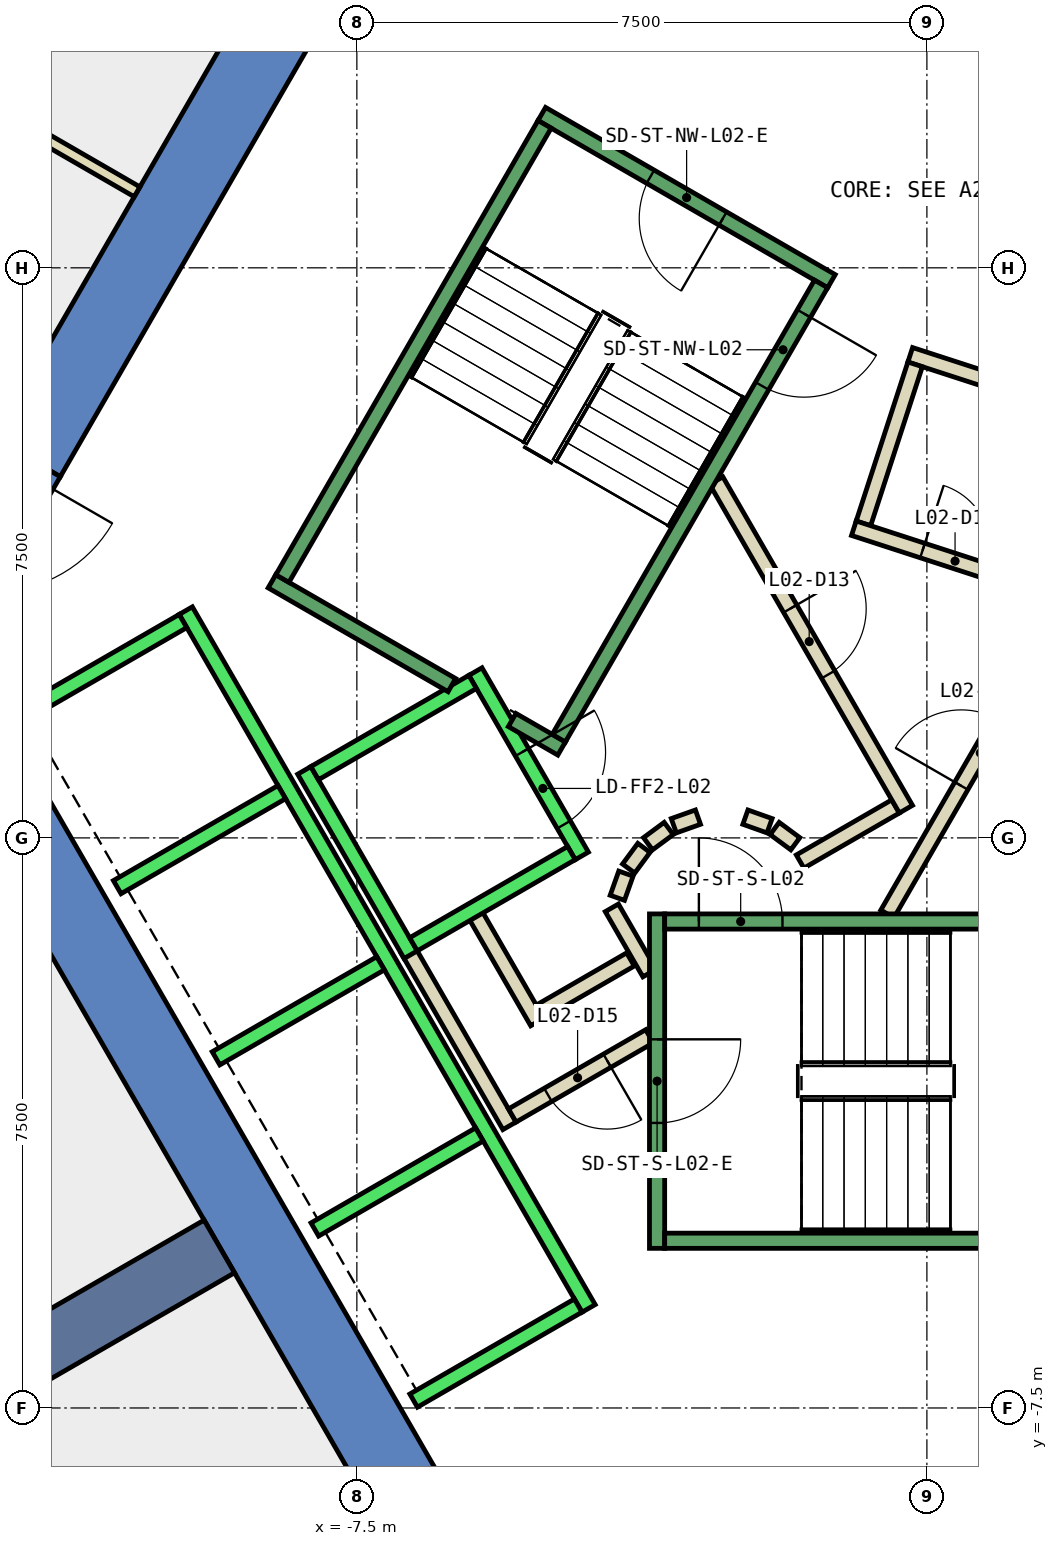
"""IFC4 building model, lengths in metres.
Left out: names, types, materials, properties, quantities, classifications, styles, units other than length and angle.
Written with IfcOpenShell. Run it as: python <this file> out.ifc"""

import sys

from ifc_helpers import new_model, si_unit, direction, frame, frame_2d, origin, place, context, subcontext, project, spatial, polyline, rectangle, outline, extrude, element, fill, save


model = new_model("IFC4")
c1 = context("Model", 3, precision=1e-05, world=origin(), true_north=direction((0.0, 1.0)))
c2 = subcontext(c1, "Body", "Model", "MODEL_VIEW")
j1 = project(units=[si_unit("LENGTHUNIT", "METRE"), si_unit("PLANEANGLEUNIT", "RADIAN")], contexts=[c1])
p1 = place(None, origin())
s1 = spatial("IfcSite", under=j1, at=p1, CompositionType="ELEMENT")
p2 = place(p1, origin())
s2 = spatial("IfcBuilding", under=s1, at=p2, CompositionType="ELEMENT")
p3 = place(p2, frame((0.0, 0.0, 15.0)))
s3 = spatial("IfcBuildingStorey", under=s2, at=p3, CompositionType="ELEMENT", Elevation=15.0)
p4 = place(p3, frame((0.0, 0.0, -0.45)))
e1 = element("IfcWall", 1, at=p4, inside=s3, PredefinedType="SHEAR", context=c2, shape_type="SweptSolid", body=[
    extrude(outline(polyline([(-12.267, 5.252), (-11.402, 4.752), (-6.351, 13.5), (-6.928, 14.5), (-12.267, 5.252)])), origin(), (0.0, 0.0, 1.0), 5.0),
])
p5 = place(p3, frame((0.0, 0.0, 3.6)))
e2 = element("IfcWall", 2, at=p5, inside=s3, PredefinedType="SHEAR", context=c2, shape_type="SweptSolid", body=[
    extrude(outline(polyline([(-13.267, 3.52), (-12.402, 3.02), (-11.402, 4.752), (-12.267, 5.252), (-13.267, 3.52)])), origin(), (0.0, 0.0, 1.0), 0.95),
])
p6 = place(p3, frame((0.0, 0.0, -0.45)))
e3 = element("IfcWall", 3, at=p6, inside=s3, PredefinedType="SHEAR", context=c2, shape_type="SweptSolid", body=[
    extrude(outline(polyline([(-13.856, 2.5), (-6.928, -9.5), (-6.351, -8.5), (-12.702, 2.5), (-13.856, 2.5)])), origin(), (0.0, 0.0, 1.0), 5.0),
])
p7 = place(p3, frame((-9.31, -5.375, -0.45), z_axis=(0.0, 0.0, 1.0), x_axis=(-0.866017533419, -0.500013631625, 0.0)))
e4 = element("IfcWall", 4, at=p7, inside=s3, PredefinedType="SHEAR", context=c2, shape_type="SweptSolid", body=[
    extrude(rectangle(XDim=9.0, YDim=0.8, at=frame_2d((4.5, 0.0))), origin(), (0.0, 0.0, 1.0), 5.0),
])
p8 = place(p3, frame((-3.9, -1.599, 0.0), z_axis=(0.0, 0.0, 1.0), x_axis=(-0.865969445389, -0.500096910261, 0.0)))
e5 = element("IfcWall", 5, at=p8, inside=s3, PredefinedType="PARTITIONING", context=c2, shape_type="SweptSolid", body=[
    extrude(rectangle(XDim=1.373, YDim=0.2, at=frame_2d((0.687, 0.0))), origin(), (0.0, 0.0, 1.0), 4.55),
])
p9 = place(p3, frame((-5.126, -2.422, 0.0), z_axis=(0.0, 0.0, 1.0), x_axis=(-0.500062241894, 0.865989465428, 0.0)))
e6 = element("IfcWall", 6, at=p9, inside=s3, PredefinedType="PARTITIONING", context=c2, shape_type="SweptSolid", body=[
    extrude(rectangle(XDim=1.7, YDim=0.2, at=frame_2d((0.85, 0.0))), origin(), (0.0, 0.0, 1.0), 4.55),
])
p10 = place(p3, frame((-5.492, -3.788, 0.0), z_axis=(0.0, 0.0, 1.0), x_axis=(-0.500008949224, 0.866020236886, 0.0)))
e7 = element("IfcWall", 7, at=p10, inside=s3, PredefinedType="PARTITIONING", context=c2, shape_type="SweptSolid", body=[
    extrude(rectangle(XDim=2.68, YDim=0.2, at=frame_2d((1.34, 0.0))), origin(), (0.0, 0.0, 1.0), 4.55),
])
p11 = place(p3, frame((-4.145, -0.92, 0.0), z_axis=(0.0, 0.0, 1.0), x_axis=(0.499743786207, -0.866173278362, 0.0)))
e8 = element("IfcWall", 8, at=p11, inside=s3, PredefinedType="PARTITIONING", context=c2, shape_type="SweptSolid", body=[
    extrude(rectangle(XDim=0.991, YDim=0.2, at=frame_2d((0.495, 0.0))), origin(), (0.0, 0.0, 1.0), 4.55),
])
p12 = place(p3, frame((-3.65, -2.61, 0.0), z_axis=(0.0, 0.0, 1.0), x_axis=(-0.866072462134, -0.499918483688, 0.0)))
e9 = element("IfcWall", 9, at=p12, inside=s3, PredefinedType="PARTITIONING", context=c2, shape_type="SweptSolid", body=[
    extrude(rectangle(XDim=2.084, YDim=0.2, at=frame_2d((1.042, 0.0))), origin(), (0.0, 0.0, 1.0), 4.55),
])
p13 = place(p12, frame((0.642, 0.0, 0.0)))
e10 = element("IfcOpeningElement", 10, at=p13, cuts=e9, PredefinedType="OPENING", context=c2, shape_type="SweptSolid", body=[
    extrude(rectangle(XDim=0.9, YDim=2.1, at=frame_2d((0.45, 1.05))), frame((0.0, 0.11, 0.0), z_axis=(0.0, -1.0, 0.0), x_axis=(1.0, 0.0, 0.0)), (0.0, 0.0, 1.0), 0.22),
])
p14 = place(p3, frame((2.285, 5.543, 0.0), z_axis=(0.0, 0.0, 1.0), x_axis=(-0.951121264368, 0.308817649215, 0.0)))
e11 = element("IfcWall", 11, at=p14, inside=s3, PredefinedType="PARTITIONING", context=c2, shape_type="SweptSolid", body=[
    extrude(rectangle(XDim=2.633, YDim=0.2, at=frame_2d((1.316, 0.0))), origin(), (0.0, 0.0, 1.0), 4.55),
])
p15 = place(p3, frame((-0.155, 6.23, 0.0), z_axis=(0.0, 0.0, 1.0), x_axis=(-0.309093600997, -0.951031621884, 0.0)))
e12 = element("IfcWall", 12, at=p15, inside=s3, PredefinedType="PARTITIONING", context=c2, shape_type="SweptSolid", body=[
    extrude(rectangle(XDim=2.2, YDim=0.2, at=frame_2d((1.1, 0.0))), origin(), (0.0, 0.0, 1.0), 4.55),
])
p16 = place(p3, frame((-0.961, 4.074, 0.0), z_axis=(0.0, 0.0, 1.0), x_axis=(0.951079555704, -0.308946077369, 0.0)))
e13 = element("IfcWall", 13, at=p16, inside=s3, PredefinedType="PARTITIONING", context=c2, shape_type="SweptSolid", body=[
    extrude(rectangle(XDim=2.8, YDim=0.2, at=frame_2d((1.4, 0.0))), origin(), (0.0, 0.0, 1.0), 4.55),
])
p17 = place(p16, frame((0.95, 0.0, 0.0)))
e14 = element("IfcOpeningElement", 14, at=p17, cuts=e13, PredefinedType="OPENING", context=c2, shape_type="SweptSolid", body=[
    extrude(rectangle(XDim=0.9, YDim=2.1, at=frame_2d((0.45, 1.05))), frame((0.0, 0.11, 0.0), z_axis=(0.0, -1.0, 0.0), x_axis=(1.0, 0.0, 0.0)), (0.0, 0.0, 1.0), 0.22),
])
p18 = place(p3, frame((-0.52, -1.0, 0.0), z_axis=(0.0, 0.0, 1.0), x_axis=(0.50011622646, 0.865958290007, 0.0)))
e15 = element("IfcWall", 15, at=p18, inside=s3, PredefinedType="PARTITIONING", context=c2, shape_type="SweptSolid", body=[
    extrude(rectangle(XDim=4.991, YDim=0.2, at=frame_2d((2.496, 0.0))), origin(), (0.0, 0.0, 1.0), 4.55),
])
p19 = place(p18, frame((1.945, 0.0, 0.0)))
e16 = element("IfcOpeningElement", 16, at=p19, cuts=e15, PredefinedType="OPENING", context=c2, shape_type="SweptSolid", body=[
    extrude(rectangle(XDim=1.0, YDim=2.1, at=frame_2d((0.5, 1.05))), frame((0.0, 0.11, 0.0), z_axis=(0.0, -1.0, 0.0), x_axis=(1.0, 0.0, 0.0)), (0.0, 0.0, 1.0), 0.22),
])
p20 = place(p3, frame((-0.412, 0.414, 0.0), z_axis=(0.0, 0.0, 1.0), x_axis=(-0.866017369001, -0.500013916395, 0.0)))
e17 = element("IfcWall", 17, at=p20, inside=s3, PredefinedType="PARTITIONING", context=c2, shape_type="SweptSolid", body=[
    extrude(rectangle(XDim=1.45, YDim=0.2, at=frame_2d((0.725, 0.0))), origin(), (0.0, 0.0, 1.0), 4.55),
])
p21 = place(p3, frame((-1.731, -0.077, 0.0), z_axis=(0.0, 0.0, 1.0), x_axis=(-0.804311165252, 0.594208338422, 0.0)))
e18 = element("IfcWall", 18, at=p21, inside=s3, PredefinedType="PARTITIONING", context=c2, shape_type="SweptSolid", body=[
    extrude(rectangle(XDim=0.338, YDim=0.2, at=frame_2d((0.169, 0.0))), origin(), (0.0, 0.0, 1.0), 4.55),
])
p22 = place(p3, frame((-2.07, 0.16, 0.0), z_axis=(0.0, 0.0, 1.0), x_axis=(-0.942199461132, 0.335052496547, 0.0)))
e19 = element("IfcWall", 19, at=p22, inside=s3, PredefinedType="PARTITIONING", context=c2, shape_type="SweptSolid", body=[
    extrude(rectangle(XDim=0.337, YDim=0.2, at=frame_2d((0.169, 0.0))), origin(), (0.0, 0.0, 1.0), 4.55),
])
p23 = place(p3, frame((-3.012, 0.273, 0.0), z_axis=(0.0, 0.0, 1.0), x_axis=(-0.942280615813, -0.334824194261, 0.0)))
e20 = element("IfcWall", 20, at=p23, inside=s3, PredefinedType="PARTITIONING", context=c2, shape_type="SweptSolid", body=[
    extrude(rectangle(XDim=0.338, YDim=0.2, at=frame_2d((0.169, 0.0))), origin(), (0.0, 0.0, 1.0), 4.55),
])
p24 = place(p3, frame((-3.397, 0.124, 0.0), z_axis=(0.0, 0.0, 1.0), x_axis=(-0.804311165252, -0.594208338422, 0.0)))
e21 = element("IfcWall", 21, at=p24, inside=s3, PredefinedType="PARTITIONING", context=c2, shape_type="SweptSolid", body=[
    extrude(rectangle(XDim=0.338, YDim=0.2, at=frame_2d((0.169, 0.0))), origin(), (0.0, 0.0, 1.0), 4.55),
])
p25 = place(p3, frame((-3.723, -0.131, 0.0), z_axis=(0.0, 0.0, 1.0), x_axis=(-0.594675113454, -0.803966112121, 0.0)))
e22 = element("IfcWall", 22, at=p25, inside=s3, PredefinedType="PARTITIONING", context=c2, shape_type="SweptSolid", body=[
    extrude(rectangle(XDim=0.338, YDim=0.2, at=frame_2d((0.169, 0.0))), origin(), (0.0, 0.0, 1.0), 4.55),
])
p26 = place(p3, frame((-3.96, -0.47, 0.0), z_axis=(0.0, 0.0, 1.0), x_axis=(-0.334824194261, -0.942280615813, 0.0)))
e23 = element("IfcWall", 23, at=p26, inside=s3, PredefinedType="PARTITIONING", context=c2, shape_type="SweptSolid", body=[
    extrude(rectangle(XDim=0.338, YDim=0.2, at=frame_2d((0.169, 0.0))), origin(), (0.0, 0.0, 1.0), 4.55),
])
p27 = place(p3, frame((-2.771, 4.7, 0.0), z_axis=(0.0, 0.0, 1.0), x_axis=(0.499969479948, -0.866043023828, 0.0)))
e24 = element("IfcWall", 24, at=p27, inside=s3, PredefinedType="PARTITIONING", context=c2, shape_type="SweptSolid", body=[
    extrude(rectangle(XDim=4.99, YDim=0.2, at=frame_2d((2.495, 0.0))), origin(), (0.0, 0.0, 1.0), 4.55),
])
p28 = place(p27, frame((1.945, 0.0, 0.0)))
e25 = element("IfcOpeningElement", 25, at=p28, cuts=e24, PredefinedType="OPENING", context=c2, shape_type="SweptSolid", body=[
    extrude(rectangle(XDim=1.0, YDim=2.1, at=frame_2d((0.5, 1.05))), frame((0.0, 0.11, 0.0), z_axis=(0.0, -1.0, 0.0), x_axis=(1.0, 0.0, 0.0)), (0.0, 0.0, 1.0), 0.22),
])
p29 = place(p3, frame((-10.392, 8.5, 0.0), z_axis=(0.0, 0.0, 1.0), x_axis=(-0.865967369837, 0.500100504277, 0.0)))
e26 = element("IfcWall", 26, at=p29, inside=s3, PredefinedType="PARTITIONING", context=c2, shape_type="SweptSolid", body=[
    extrude(rectangle(XDim=6.317, YDim=0.15, at=frame_2d((3.158, 0.0))), origin(), (0.0, 0.0, 1.0), 4.55),
])
p30 = place(p29, frame((2.33, 0.0, 0.0)))
e27 = element("IfcOpeningElement", 27, at=p30, cuts=e26, PredefinedType="OPENING", context=c2, shape_type="SweptSolid", body=[
    extrude(rectangle(XDim=1.8, YDim=2.1, at=frame_2d((0.9, 1.05))), frame((0.0, 0.085, 0.0), z_axis=(0.0, -1.0, 0.0), x_axis=(1.0, 0.0, 0.0)), (0.0, 0.0, 1.0), 0.17),
])
p31 = place(p3, frame((-5.94, 2.188, 0.0), z_axis=(0.0, 0.0, 1.0), x_axis=(0.49994636267, -0.866056369097, 0.0)))
e28 = element("IfcWall", 28, at=p31, inside=s3, PredefinedType="STANDARD", context=c2, shape_type="SweptSolid", body=[
    extrude(rectangle(XDim=2.8, YDim=0.2, at=frame_2d((1.4, 0.0))), origin(), (0.0, 0.0, 1.0), 4.55),
])
p32 = place(p31, frame((1.225, 0.0, 0.0)))
e29 = element("IfcOpeningElement", 29, at=p32, cuts=e28, PredefinedType="OPENING", context=c2, shape_type="SweptSolid", body=[
    extrude(rectangle(XDim=1.1, YDim=2.1, at=frame_2d((0.55, 1.05))), frame((0.0, 0.11, 0.0), z_axis=(0.0, -1.0, 0.0), x_axis=(1.0, 0.0, 0.0)), (0.0, 0.0, 1.0), 0.22),
])
p33 = place(p3, frame((-8.192, 0.888, 0.0), z_axis=(0.0, 0.0, 1.0), x_axis=(0.49994636267, -0.866056369097, 0.0)))
e30 = element("IfcWall", 30, at=p33, inside=s3, PredefinedType="STANDARD", context=c2, shape_type="SweptSolid", body=[
    extrude(rectangle(XDim=2.8, YDim=0.2, at=frame_2d((1.4, 0.0))), origin(), (0.0, 0.0, 1.0), 4.55),
])
for number, where, z_axis, x_axis in (
    (31, (-5.977, 2.052, 0.0), (0.0, 0.0, 1.0), (-0.866, -0.5, 0.0)),
    (32, (-4.677, -0.2, 0.0), (0.0, 0.0, 1.0), (-0.866, -0.5, 0.0)),
):
    element("IfcWall", number, at=place(p3, frame(where, z_axis=z_axis, x_axis=x_axis)), inside=s3, PredefinedType="STANDARD", context=c2, shape_type="SweptSolid", body=[
        extrude(rectangle(XDim=2.399, YDim=0.2, at=frame_2d((1.2, 0.0))), origin(), (0.0, 0.0, 1.0), 4.55),
    ])
p34 = place(p3, frame((-9.751, 2.99, 0.0), z_axis=(0.0, 0.0, 1.0), x_axis=(0.50000090737, -0.866024879913, 0.0)))
e33 = element("IfcWall", 33, at=p34, inside=s3, PredefinedType="STANDARD", context=c2, shape_type="SweptSolid", body=[
    extrude(rectangle(XDim=10.6, YDim=0.2, at=frame_2d((5.3, 0.0))), origin(), (0.0, 0.0, 1.0), 4.55),
])
p35 = place(p3, frame((-9.788, 2.853, 0.0), z_axis=(0.0, 0.0, 1.0), x_axis=(-0.865998541277, -0.500046524342, 0.0)))
e34 = element("IfcWall", 34, at=p35, inside=s3, PredefinedType="STANDARD", context=c2, shape_type="SweptSolid", body=[
    extrude(rectangle(XDim=2.5, YDim=0.2, at=frame_2d((1.25, 0.0))), origin(), (0.0, 0.0, 1.0), 4.55),
])
for number, where, z_axis, x_axis in (
    (35, (-8.488, 0.602, 0.0), (0.0, 0.0, 1.0), (-0.866, -0.5, 0.0)),
    (36, (-7.188, -1.65, 0.0), (0.0, 0.0, 1.0), (-0.866, -0.5, 0.0)),
    (37, (-5.888, -3.902, 0.0), (0.0, 0.0, 1.0), (-0.866, -0.5, 0.0)),
    (38, (-4.588, -6.153, 0.0), (0.0, 0.0, 1.0), (-0.866, -0.5, 0.0)),
):
    element("IfcWall", number, at=place(p3, frame(where, z_axis=z_axis, x_axis=x_axis)), inside=s3, PredefinedType="STANDARD", context=c2, shape_type="SweptSolid", body=[
        extrude(rectangle(XDim=2.5, YDim=0.2, at=frame_2d((1.25, 0.0))), origin(), (0.0, 0.0, 1.0), 4.55),
    ])
p36 = place(p3, frame((-3.55, -1.0, 0.0), z_axis=(0.0, 0.0, 1.0), x_axis=(0.0, -1.0, 0.0)))
e39 = element("IfcWall", 39, at=p36, inside=s3, PredefinedType="STANDARD", context=c2, shape_type="SweptSolid", body=[
    extrude(rectangle(XDim=4.4, YDim=0.2, at=frame_2d((2.2, 0.0))), origin(), (0.0, 0.0, 1.0), 4.55),
])
p37 = place(p36, frame((1.65, 0.0, 0.0)))
e40 = element("IfcOpeningElement", 40, at=p37, cuts=e39, PredefinedType="OPENING", context=c2, shape_type="SweptSolid", body=[
    extrude(rectangle(XDim=1.1, YDim=2.2, at=frame_2d((0.55, 1.1))), frame((0.0, 0.11, 0.0), z_axis=(0.0, -1.0, 0.0), x_axis=(1.0, 0.0, 0.0)), (0.0, 0.0, 1.0), 0.22),
])
p38 = place(p3, frame((-3.45, -1.1, 0.0), z_axis=(0.0, 0.0, 1.0), x_axis=(1.0, 0.0, 0.0)))
e41 = element("IfcWall", 41, at=p38, inside=s3, PredefinedType="STANDARD", context=c2, shape_type="SweptSolid", body=[
    extrude(rectangle(XDim=6.9, YDim=0.2, at=frame_2d((3.45, 0.0))), origin(), (0.0, 0.0, 1.0), 4.55),
])
p39 = place(p38, frame((0.45, 0.0, 0.0)))
e42 = element("IfcOpeningElement", 42, at=p39, cuts=e41, PredefinedType="OPENING", context=c2, shape_type="SweptSolid", body=[
    extrude(rectangle(XDim=1.1, YDim=2.2, at=frame_2d((0.55, 1.1))), frame((0.0, 0.11, 0.0), z_axis=(0.0, -1.0, 0.0), x_axis=(1.0, 0.0, 0.0)), (0.0, 0.0, 1.0), 0.22),
])
p40 = place(p3, frame((-3.45, -5.3, 0.0), z_axis=(0.0, 0.0, 1.0), x_axis=(1.0, 0.0, 0.0)))
e43 = element("IfcWall", 43, at=p40, inside=s3, PredefinedType="STANDARD", context=c2, shape_type="SweptSolid", body=[
    extrude(rectangle(XDim=6.9, YDim=0.2, at=frame_2d((3.45, 0.0))), origin(), (0.0, 0.0, 1.0), 4.55),
])
p41 = place(p3, frame((-1.256, 7.324, 0.0), z_axis=(0.0, 0.0, 1.0), x_axis=(-0.866046073146, 0.499964197906, 0.0)))
e44 = element("IfcWall", 44, at=p41, inside=s3, PredefinedType="STANDARD", context=c2, shape_type="SweptSolid", body=[
    extrude(rectangle(XDim=4.4, YDim=0.2, at=frame_2d((2.2, 0.0))), origin(), (0.0, 0.0, 1.0), 4.55),
])
p42 = place(p41, frame((1.65, 0.0, 0.0)))
e45 = element("IfcOpeningElement", 45, at=p42, cuts=e44, PredefinedType="OPENING", context=c2, shape_type="SweptSolid", body=[
    extrude(rectangle(XDim=1.1, YDim=2.2, at=frame_2d((0.55, 1.1))), frame((0.0, 0.11, 0.0), z_axis=(0.0, -1.0, 0.0), x_axis=(1.0, 0.0, 0.0)), (0.0, 0.0, 1.0), 0.22),
])
p43 = place(p3, frame((-6.25, 2.01, 0.0), z_axis=(0.0, 0.0, 1.0), x_axis=(-0.86611865017, 0.499838457731, 0.0)))
e46 = element("IfcWall", 46, at=p43, inside=s3, PredefinedType="STANDARD", context=c2, shape_type="SweptSolid", body=[
    extrude(rectangle(XDim=2.733, YDim=0.2, at=frame_2d((1.366, 0.0))), origin(), (0.0, 0.0, 1.0), 4.55),
])
p44 = place(p3, frame((-4.806, 1.176, 0.0), z_axis=(0.0, 0.0, 1.0), x_axis=(-0.866558586415, 0.499075361355, 0.0)))
e47 = element("IfcWall", 47, at=p44, inside=s3, PredefinedType="STANDARD", context=c2, shape_type="SweptSolid", body=[
    extrude(rectangle(XDim=0.751, YDim=0.2, at=frame_2d((0.376, 0.0))), origin(), (0.0, 0.0, 1.0), 4.55),
])
p45 = place(p3, frame((-1.393, 7.288, 0.0), z_axis=(0.0, 0.0, 1.0), x_axis=(-0.499963383562, -0.866046543262, 0.0)))
e48 = element("IfcWall", 48, at=p45, inside=s3, PredefinedType="STANDARD", context=c2, shape_type="SweptSolid", body=[
    extrude(rectangle(XDim=6.9, YDim=0.2, at=frame_2d((3.45, 0.0))), origin(), (0.0, 0.0, 1.0), 4.55),
])
p46 = place(p45, frame((0.45, 0.0, 0.0)))
e49 = element("IfcOpeningElement", 49, at=p46, cuts=e48, PredefinedType="OPENING", context=c2, shape_type="SweptSolid", body=[
    extrude(rectangle(XDim=1.1, YDim=2.2, at=frame_2d((0.55, 1.1))), frame((0.0, 0.11, 0.0), z_axis=(0.0, -1.0, 0.0), x_axis=(1.0, 0.0, 0.0)), (0.0, 0.0, 1.0), 0.22),
])
p47 = place(p3, frame((-5.03, 9.388, 0.0), z_axis=(0.0, 0.0, 1.0), x_axis=(-0.499978703459, -0.866037698999, 0.0)))
e50 = element("IfcWall", 50, at=p47, inside=s3, PredefinedType="STANDARD", context=c2, shape_type="SweptSolid", body=[
    extrude(rectangle(XDim=6.9, YDim=0.2, at=frame_2d((3.45, 0.0))), origin(), (0.0, 0.0, 1.0), 4.55),
])
p48 = place(p19, origin())
e51 = element("IfcDoor", 51, at=p48, inside=s3, OperationType="SINGLE_SWING_LEFT", PredefinedType="DOOR", context=c2, shape_type="SweptSolid", body=[
    extrude(rectangle(XDim=1.0, YDim=2.1, at=frame_2d((0.5, 1.05))), frame((0.0, 0.025, 0.0), z_axis=(0.0, -1.0, 0.0), x_axis=(1.0, 0.0, 0.0)), (0.0, 0.0, 1.0), 0.05),
])
fill(e16, e51)
p49 = place(p28, origin())
e52 = element("IfcDoor", 52, at=p49, inside=s3, OperationType="SINGLE_SWING_RIGHT", PredefinedType="DOOR", context=c2, shape_type="SweptSolid", body=[
    extrude(rectangle(XDim=1.0, YDim=2.1, at=frame_2d((0.5, 1.05))), frame((0.0, 0.025, 0.0), z_axis=(0.0, -1.0, 0.0), x_axis=(1.0, 0.0, 0.0)), (0.0, 0.0, 1.0), 0.05),
])
fill(e25, e52)
p50 = place(p13, origin())
e53 = element("IfcDoor", 53, at=p50, inside=s3, OperationType="SINGLE_SWING_LEFT", PredefinedType="DOOR", context=c2, shape_type="SweptSolid", body=[
    extrude(rectangle(XDim=0.9, YDim=2.1, at=frame_2d((0.45, 1.05))), frame((0.0, 0.025, 0.0), z_axis=(0.0, -1.0, 0.0), x_axis=(1.0, 0.0, 0.0)), (0.0, 0.0, 1.0), 0.05),
])
fill(e10, e53)
p51 = place(p17, origin())
e54 = element("IfcDoor", 54, at=p51, inside=s3, OperationType="SINGLE_SWING_LEFT", PredefinedType="DOOR", context=c2, shape_type="SweptSolid", body=[
    extrude(rectangle(XDim=0.9, YDim=2.1, at=frame_2d((0.45, 1.05))), frame((0.0, 0.025, 0.0), z_axis=(0.0, -1.0, 0.0), x_axis=(1.0, 0.0, 0.0)), (0.0, 0.0, 1.0), 0.05),
])
fill(e14, e54)
p52 = place(p32, origin())
e55 = element("IfcDoor", 55, at=p52, inside=s3, OperationType="SLIDING_TO_LEFT", PredefinedType="DOOR", context=c2, shape_type="SweptSolid", body=[
    extrude(rectangle(XDim=1.1, YDim=2.1, at=frame_2d((0.55, 1.05))), frame((0.0, 0.025, 0.0), z_axis=(0.0, -1.0, 0.0), x_axis=(1.0, 0.0, 0.0)), (0.0, 0.0, 1.0), 0.05),
])
fill(e29, e55)
p53 = place(p39, origin())
e56 = element("IfcDoor", 56, at=p53, inside=s3, OperationType="SINGLE_SWING_LEFT", PredefinedType="DOOR", context=c2, shape_type="SweptSolid", body=[
    extrude(rectangle(XDim=1.1, YDim=2.2, at=frame_2d((0.55, 1.1))), frame((0.0, 0.025, 0.0), z_axis=(0.0, -1.0, 0.0), x_axis=(1.0, 0.0, 0.0)), (0.0, 0.0, 1.0), 0.05),
])
fill(e42, e56)
p54 = place(p37, origin())
e57 = element("IfcDoor", 57, at=p54, inside=s3, OperationType="SINGLE_SWING_LEFT", PredefinedType="DOOR", context=c2, shape_type="SweptSolid", body=[
    extrude(rectangle(XDim=1.1, YDim=2.2, at=frame_2d((0.55, 1.1))), frame((0.0, 0.025, 0.0), z_axis=(0.0, -1.0, 0.0), x_axis=(1.0, 0.0, 0.0)), (0.0, 0.0, 1.0), 0.05),
])
fill(e40, e57)
p55 = place(p46, origin())
e58 = element("IfcDoor", 58, at=p55, inside=s3, OperationType="SINGLE_SWING_LEFT", PredefinedType="DOOR", context=c2, shape_type="SweptSolid", body=[
    extrude(rectangle(XDim=1.1, YDim=2.2, at=frame_2d((0.55, 1.1))), frame((0.0, 0.025, 0.0), z_axis=(0.0, -1.0, 0.0), x_axis=(1.0, 0.0, 0.0)), (0.0, 0.0, 1.0), 0.05),
])
fill(e49, e58)
p56 = place(p42, origin())
e59 = element("IfcDoor", 59, at=p56, inside=s3, OperationType="SINGLE_SWING_LEFT", PredefinedType="DOOR", context=c2, shape_type="SweptSolid", body=[
    extrude(rectangle(XDim=1.1, YDim=2.2, at=frame_2d((0.55, 1.1))), frame((0.0, 0.025, 0.0), z_axis=(0.0, -1.0, 0.0), x_axis=(1.0, 0.0, 0.0)), (0.0, 0.0, 1.0), 0.05),
])
fill(e45, e59)
save(model, sys.argv[1])
